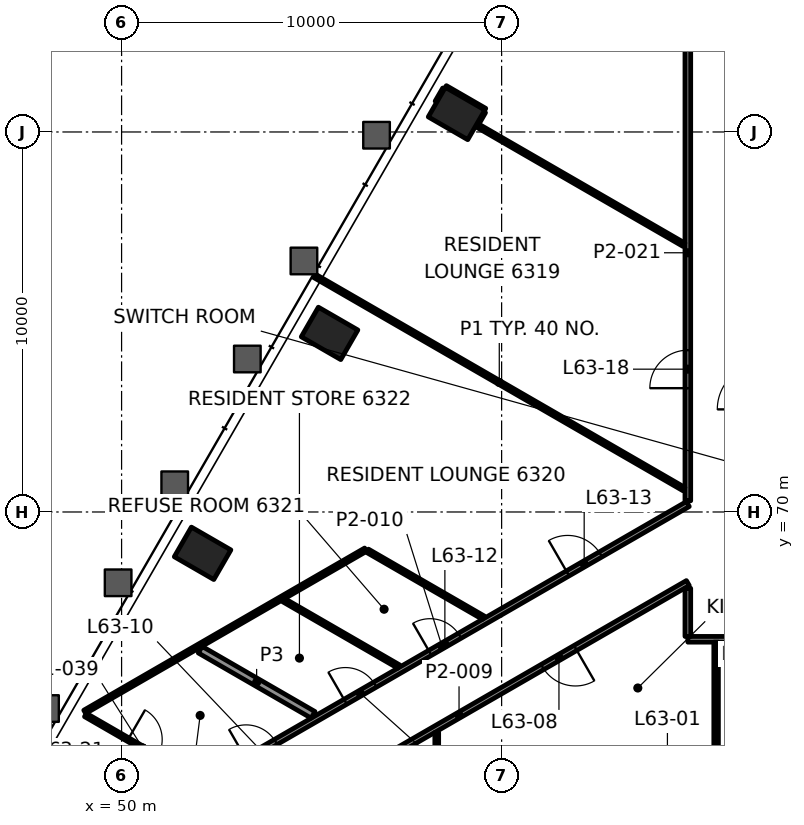
"""IFC4 building model, lengths in metres.
Left out: names, types, materials, properties, quantities, classifications, styles, units other than length and angle.
Written with IfcOpenShell. Run it as: python <this file> out.ifc"""

import sys

from ifc_helpers import new_model, si_unit, direction, frame, frame_2d, origin, origin_2d, place, context, subcontext, project, spatial, rectangle, hollow_rectangle, extrude, element, fill, save


model = new_model("IFC4")
c1 = context("Model", 3, precision=1e-05, world=origin(), true_north=direction((0.0, 1.0)))
c2 = subcontext(c1, "Body", "Model", "MODEL_VIEW")
j1 = project(units=[si_unit("LENGTHUNIT", "METRE"), si_unit("PLANEANGLEUNIT", "RADIAN")], contexts=[c1])
p1 = place(None, origin())
s1 = spatial("IfcSite", under=j1, at=p1, CompositionType="ELEMENT")
p2 = place(p1, origin())
s2 = spatial("IfcBuilding", under=s1, at=p2, CompositionType="ELEMENT")
p3 = place(p2, frame((0.0, 0.0, 267.1)))
s3 = spatial("IfcBuildingStorey", under=s2, at=p3, CompositionType="ELEMENT", Elevation=267.1)
for number, where, z_axis, x_axis in (
    (1, (58.814, 80.487, -0.0), (0.0, 0.0, 1.0), (-0.5, -0.866, 0.0)),
    (2, (55.473, 74.699, -0.0), (0.0, 0.0, 1.0), (-0.5, -0.866, 0.0)),
    (3, (52.131, 68.912, -0.0), (0.0, 0.0, 1.0), (-0.5, -0.866, 0.0)),
):
    element("IfcColumn", number, at=place(p3, frame(where, z_axis=z_axis, x_axis=x_axis)), inside=s3, PredefinedType="COLUMN", context=c2, shape_type="SweptSolid", body=[
        extrude(hollow_rectangle(XDim=0.9, YDim=1.2, WallThickness=0.06, at=origin_2d()), origin(), (0.0, 0.0, 1.0), 3.5),
    ])
p4 = place(p3, frame((85.1, 66.65, 0.0), z_axis=(0.0, 0.0, 1.0), x_axis=(-1.0, 0.0, 0.0)))
e4 = element("IfcWall", 4, at=p4, inside=s3, PredefinedType="PARTITIONING", context=c2, shape_type="SweptSolid", body=[
    extrude(rectangle(XDim=20.2, YDim=0.15, at=frame_2d((10.1, 0.0))), origin(), (0.0, 0.0, 1.0), 2.7),
])
p5 = place(p4, frame((1.61, 0.0, 0.0)))
e5 = element("IfcOpeningElement", 5, at=p5, cuts=e4, PredefinedType="OPENING", context=c2, shape_type="SweptSolid", body=[
    extrude(rectangle(XDim=1.0, YDim=2.1, at=frame_2d((0.5, 1.05))), frame((0.0, 0.085, 0.0), z_axis=(0.0, -1.0, 0.0), x_axis=(1.0, 0.0, 0.0)), (0.0, 0.0, 1.0), 0.17),
])
p6 = place(p4, frame((8.229, 0.0, 0.0)))
e6 = element("IfcOpeningElement", 6, at=p6, cuts=e4, PredefinedType="OPENING", context=c2, shape_type="SweptSolid", body=[
    extrude(rectangle(XDim=1.0, YDim=2.1, at=frame_2d((0.5, 1.05))), frame((0.0, 0.085, 0.0), z_axis=(0.0, -1.0, 0.0), x_axis=(1.0, 0.0, 0.0)), (0.0, 0.0, 1.0), 0.17),
])
p7 = place(p3, frame((64.9, 68.13, 0.0), z_axis=(0.0, 0.0, 1.0), x_axis=(-0.866020369651, -0.500008719273, 0.0)))
e7 = element("IfcWall", 7, at=p7, inside=s3, PredefinedType="PARTITIONING", context=c2, shape_type="SweptSolid", body=[
    extrude(rectangle(XDim=13.904, YDim=0.15, at=frame_2d((6.952, 0.0))), origin(), (0.0, 0.0, 1.0), 2.547),
])
p8 = place(p7, frame((3.416, 0.0, 0.0)))
e8 = element("IfcOpeningElement", 8, at=p8, cuts=e7, PredefinedType="OPENING", context=c2, shape_type="SweptSolid", body=[
    extrude(rectangle(XDim=1.0, YDim=2.1, at=frame_2d((0.5, 1.05))), frame((0.0, 0.085, 0.0), z_axis=(0.0, -1.0, 0.0), x_axis=(1.0, 0.0, 0.0)), (0.0, 0.0, 1.0), 0.17),
])
p9 = place(p7, frame((10.215, 0.0, 0.0)))
e9 = element("IfcOpeningElement", 9, at=p9, cuts=e7, PredefinedType="OPENING", context=c2, shape_type="SweptSolid", body=[
    extrude(rectangle(XDim=0.9, YDim=2.1, at=frame_2d((0.45, 1.05))), frame((0.0, 0.085, 0.0), z_axis=(0.0, -1.0, 0.0), x_axis=(1.0, 0.0, 0.0)), (0.0, 0.0, 1.0), 0.17),
])
p10 = place(p3, frame((51.959, 62.736, 0.0), z_axis=(0.0, 0.0, 1.0), x_axis=(0.866022614424, 0.500004831283, 0.0)))
e10 = element("IfcWall", 10, at=p10, inside=s3, PredefinedType="PARTITIONING", context=c2, shape_type="SweptSolid", body=[
    extrude(rectangle(XDim=14.943, YDim=0.15, at=frame_2d((7.472, 0.0))), origin(), (0.0, 0.0, 1.0), 2.7),
])
p11 = place(p10, frame((1.522, 0.0, 0.0)))
e11 = element("IfcOpeningElement", 11, at=p11, cuts=e10, PredefinedType="OPENING", context=c2, shape_type="SweptSolid", body=[
    extrude(rectangle(XDim=0.9, YDim=2.1, at=frame_2d((0.45, 1.05))), frame((0.0, 0.085, 0.0), z_axis=(0.0, -1.0, 0.0), x_axis=(1.0, 0.0, 0.0)), (0.0, 0.0, 1.0), 0.17),
])
p12 = place(p10, frame((4.539, 0.0, 0.0)))
e12 = element("IfcOpeningElement", 12, at=p12, cuts=e10, PredefinedType="OPENING", context=c2, shape_type="SweptSolid", body=[
    extrude(rectangle(XDim=0.9, YDim=2.1, at=frame_2d((0.45, 1.05))), frame((0.0, 0.085, 0.0), z_axis=(0.0, -1.0, 0.0), x_axis=(1.0, 0.0, 0.0)), (0.0, 0.0, 1.0), 0.17),
])
p13 = place(p10, frame((7.111, 0.0, 0.0)))
e13 = element("IfcOpeningElement", 13, at=p13, cuts=e10, PredefinedType="OPENING", context=c2, shape_type="SweptSolid", body=[
    extrude(rectangle(XDim=0.9, YDim=2.1, at=frame_2d((0.45, 1.05))), frame((0.0, 0.085, 0.0), z_axis=(0.0, -1.0, 0.0), x_axis=(1.0, 0.0, 0.0)), (0.0, 0.0, 1.0), 0.17),
])
p14 = place(p10, frame((11.294, 0.0, 0.0)))
e14 = element("IfcOpeningElement", 14, at=p14, cuts=e10, PredefinedType="OPENING", context=c2, shape_type="SweptSolid", body=[
    extrude(rectangle(XDim=1.0, YDim=2.1, at=frame_2d((0.5, 1.05))), frame((0.0, 0.085, 0.0), z_axis=(0.0, -1.0, 0.0), x_axis=(1.0, 0.0, 0.0)), (0.0, 0.0, 1.0), 0.17),
])
p15 = place(p3, frame((49.03, 64.741, 0.0), z_axis=(0.0, 0.0, 1.0), x_axis=(0.866019796467, 0.500009712033, 0.0)))
e15 = element("IfcWall", 15, at=p15, inside=s3, PredefinedType="PARTITIONING", context=c2, shape_type="SweptSolid", body=[
    extrude(rectangle(XDim=8.534, YDim=0.1, at=frame_2d((4.267, 0.0))), origin(), (0.0, 0.0, 1.0), 2.7),
])
p16 = place(p3, frame((59.359, 80.23, 0.0), z_axis=(0.0, 0.0, 1.0), x_axis=(0.499539972301, 0.866290838041, 0.0)))
e16 = element("IfcWall", 16, at=p16, inside=s3, PredefinedType="PARTITIONING", context=c2, shape_type="SweptSolid", body=[
    extrude(rectangle(XDim=0.347, YDim=0.1, at=frame_2d((0.174, 0.0))), origin(), (0.0, 0.0, 1.0), 2.7),
])
p17 = place(p3, frame((58.294, 80.787, 0.0), z_axis=(0.0, 0.0, 1.0), x_axis=(0.500165123728, 0.865930048564, 0.0)))
e17 = element("IfcWall", 17, at=p17, inside=s3, PredefinedType="PARTITIONING", context=c2, shape_type="SweptSolid", body=[
    extrude(rectangle(XDim=0.398, YDim=0.1, at=frame_2d((0.199, 0.0))), origin(), (0.0, 0.0, 1.0), 2.7),
])
p18 = place(p3, frame((65.644, 66.575, 0.0), z_axis=(0.0, 0.0, 1.0), x_axis=(0.0, -1.0, 0.0)))
e18 = element("IfcWall", 18, at=p18, inside=s3, PredefinedType="PARTITIONING", context=c2, shape_type="SweptSolid", body=[
    extrude(rectangle(XDim=9.436, YDim=0.12, at=frame_2d((4.718, 0.0))), origin(), (0.0, 0.0, 1.0), 2.688),
])
p19 = place(p18, frame((5.38, 0.0, 0.0)))
e19 = element("IfcOpeningElement", 19, at=p19, cuts=e18, PredefinedType="OPENING", context=c2, shape_type="SweptSolid", body=[
    extrude(rectangle(XDim=0.9, YDim=2.1, at=frame_2d((0.45, 1.05))), frame((0.0, 0.07, 0.0), z_axis=(0.0, -1.0, 0.0), x_axis=(1.0, 0.0, 0.0)), (0.0, 0.0, 1.0), 0.14),
])
p20 = place(p3, frame((64.9, 66.725, 0.0), z_axis=(0.0, 0.0, 1.0), x_axis=(0.0, 1.0, 0.0)))
e20 = element("IfcWall", 20, at=p20, inside=s3, PredefinedType="PARTITIONING", context=c2, shape_type="SweptSolid", body=[
    extrude(rectangle(XDim=1.268, YDim=0.15, at=frame_2d((0.634, 0.0))), origin(), (0.0, 0.0, 1.0), 2.547),
])
p21 = place(p3, frame((64.9, 70.295, 0.0), z_axis=(0.0, 0.0, 1.0), x_axis=(0.0, 1.0, 0.0)))
e21 = element("IfcWall", 21, at=p21, inside=s3, PredefinedType="PARTITIONING", context=c2, shape_type="SweptSolid", body=[
    extrude(rectangle(XDim=13.053, YDim=0.15, at=frame_2d((6.527, 0.0))), origin(), (0.0, 0.0, 1.0), 2.7),
])
p22 = place(p21, frame((2.963, 0.0, 0.0)))
e22 = element("IfcOpeningElement", 22, at=p22, cuts=e21, PredefinedType="OPENING", context=c2, shape_type="SweptSolid", body=[
    extrude(rectangle(XDim=1.0, YDim=2.1, at=frame_2d((0.5, 1.05))), frame((0.0, 0.085, 0.0), z_axis=(0.0, -1.0, 0.0), x_axis=(1.0, 0.0, 0.0)), (0.0, 0.0, 1.0), 0.17),
])
p23 = place(p3, frame((59.557, 80.578, 0.0), z_axis=(0.0, 0.0, 1.0), x_axis=(-0.866035997947, 0.499981649923, 0.0)))
e23 = element("IfcWall", 23, at=p23, inside=s3, PredefinedType="PARTITIONING", context=c2, shape_type="SweptSolid", body=[
    extrude(rectangle(XDim=1.196, YDim=0.1, at=frame_2d((0.598, 0.0))), origin(), (0.0, 0.0, 1.0), 2.688),
])
p24 = place(p3, frame((64.799, 77.032, 0.0), z_axis=(0.0, 0.0, 1.0), x_axis=(-0.866032246126, 0.49998814853, 0.0)))
e24 = element("IfcWall", 24, at=p24, inside=s3, PredefinedType="PARTITIONING", context=c2, shape_type="SweptSolid", body=[
    extrude(rectangle(XDim=6.31, YDim=0.1, at=frame_2d((3.155, 0.0))), origin(), (0.0, 0.0, 1.0), 2.7),
])
p25 = place(p3, frame((64.799, 70.601, 0.0), z_axis=(0.0, 0.0, 1.0), x_axis=(-0.86602224969, 0.500005463012, 0.0)))
e25 = element("IfcWall", 25, at=p25, inside=s3, PredefinedType="PARTITIONING", context=c2, shape_type="SweptSolid", body=[
    extrude(rectangle(XDim=11.226, YDim=0.1, at=frame_2d((5.613, 0.0))), origin(), (0.0, 0.0, 1.0), 2.688),
])
p26 = place(p3, frame((59.52, 67.219, 0.0), z_axis=(0.0, 0.0, 1.0), x_axis=(-0.866011216541, 0.500024572222, 0.0)))
e26 = element("IfcWall", 26, at=p26, inside=s3, PredefinedType="PARTITIONING", context=c2, shape_type="SweptSolid", body=[
    extrude(rectangle(XDim=3.521, YDim=0.1, at=frame_2d((1.76, 0.0))), origin(), (0.0, 0.0, 1.0), 2.7),
])
p27 = place(p3, frame((57.292, 65.932, 0.0), z_axis=(0.0, 0.0, 1.0), x_axis=(-0.866017863565, 0.500013059815, 0.0)))
e27 = element("IfcWall", 27, at=p27, inside=s3, PredefinedType="PARTITIONING", context=c2, shape_type="SweptSolid", body=[
    extrude(rectangle(XDim=3.491, YDim=0.1, at=frame_2d((1.745, 0.0))), origin(), (0.0, 0.0, 1.0), 2.7),
])
p28 = place(p3, frame((55.039, 64.662, 0.0), z_axis=(0.0, 0.0, 1.0), x_axis=(-0.866036273972, 0.49998117181, 0.0)))
e28 = element("IfcWall", 28, at=p28, inside=s3, PredefinedType="PARTITIONING", context=c2, shape_type="SweptSolid", body=[
    extrude(rectangle(XDim=3.431, YDim=0.2, at=frame_2d((1.715, 0.0))), origin(), (0.0, 0.0, 1.0), 2.7),
])
p29 = place(p3, frame((49.049, 64.658, 0.0), z_axis=(0.0, 0.0, 1.0), x_axis=(0.866031592922, -0.499989279946, 0.0)))
e29 = element("IfcWall", 29, at=p29, inside=s3, PredefinedType="PARTITIONING", context=c2, shape_type="SweptSolid", body=[
    extrude(rectangle(XDim=3.485, YDim=0.1, at=frame_2d((1.742, 0.0))), origin(), (0.0, 0.0, 1.0), 2.7),
])
p30 = place(p29, frame((1.292, 0.0, 0.0)))
e30 = element("IfcOpeningElement", 30, at=p30, cuts=e29, PredefinedType="OPENING", context=c2, shape_type="SweptSolid", body=[
    extrude(rectangle(XDim=0.9, YDim=2.1, at=frame_2d((0.45, 1.05))), frame((0.0, 0.06, 0.0), z_axis=(0.0, -1.0, 0.0), x_axis=(1.0, 0.0, 0.0)), (0.0, 0.0, 1.0), 0.12),
])
p31 = place(p3, frame((58.293, 60.938, 0.0), z_axis=(0.0, 0.0, 1.0), x_axis=(0.0, 1.0, 0.0)))
e31 = element("IfcWall", 31, at=p31, inside=s3, PredefinedType="PARTITIONING", context=c2, shape_type="SweptSolid", body=[
    extrude(rectangle(XDim=3.261, YDim=0.1, at=frame_2d((1.63, 0.0))), origin(), (0.0, 0.0, 1.0), 2.7),
])
p32 = place(p8, origin())
e32 = element("IfcDoor", 32, at=p32, inside=s3, OperationType="SINGLE_SWING_RIGHT", PredefinedType="DOOR", context=c2, shape_type="SweptSolid", body=[
    extrude(rectangle(XDim=1.0, YDim=2.1, at=frame_2d((0.5, 1.05))), frame((0.0, 0.025, 0.0), z_axis=(0.0, -1.0, 0.0), x_axis=(1.0, 0.0, 0.0)), (0.0, 0.0, 1.0), 0.05),
])
fill(e8, e32)
p33 = place(p11, origin())
e33 = element("IfcDoor", 33, at=p33, inside=s3, OperationType="SINGLE_SWING_RIGHT", PredefinedType="DOOR", context=c2, shape_type="SweptSolid", body=[
    extrude(rectangle(XDim=0.9, YDim=2.1, at=frame_2d((0.45, 1.05))), frame((0.0, 0.025, 0.0), z_axis=(0.0, -1.0, 0.0), x_axis=(1.0, 0.0, 0.0)), (0.0, 0.0, 1.0), 0.05),
])
fill(e11, e33)
p34 = place(p12, origin())
e34 = element("IfcDoor", 34, at=p34, inside=s3, OperationType="SINGLE_SWING_LEFT", PredefinedType="DOOR", context=c2, shape_type="SweptSolid", body=[
    extrude(rectangle(XDim=0.9, YDim=2.1, at=frame_2d((0.45, 1.05))), frame((0.0, 0.025, 0.0), z_axis=(0.0, -1.0, 0.0), x_axis=(1.0, 0.0, 0.0)), (0.0, 0.0, 1.0), 0.05),
])
fill(e12, e34)
p35 = place(p13, origin())
e35 = element("IfcDoor", 35, at=p35, inside=s3, OperationType="SINGLE_SWING_RIGHT", PredefinedType="DOOR", context=c2, shape_type="SweptSolid", body=[
    extrude(rectangle(XDim=0.9, YDim=2.1, at=frame_2d((0.45, 1.05))), frame((0.0, 0.025, 0.0), z_axis=(0.0, -1.0, 0.0), x_axis=(1.0, 0.0, 0.0)), (0.0, 0.0, 1.0), 0.05),
])
fill(e13, e35)
p36 = place(p14, origin())
e36 = element("IfcDoor", 36, at=p36, inside=s3, OperationType="SINGLE_SWING_LEFT", PredefinedType="DOOR", context=c2, shape_type="SweptSolid", body=[
    extrude(rectangle(XDim=1.0, YDim=2.1, at=frame_2d((0.5, 1.05))), frame((0.0, 0.025, 0.0), z_axis=(0.0, -1.0, 0.0), x_axis=(1.0, 0.0, 0.0)), (0.0, 0.0, 1.0), 0.05),
])
fill(e14, e36)
p37 = place(p22, origin())
e37 = element("IfcDoor", 37, at=p37, inside=s3, OperationType="SINGLE_SWING_RIGHT", PredefinedType="DOOR", context=c2, shape_type="SweptSolid", body=[
    extrude(rectangle(XDim=1.0, YDim=2.1, at=frame_2d((0.5, 1.05))), frame((0.0, 0.025, 0.0), z_axis=(0.0, -1.0, 0.0), x_axis=(1.0, 0.0, 0.0)), (0.0, 0.0, 1.0), 0.05),
])
fill(e22, e37)
p38 = place(p30, origin())
e38 = element("IfcDoor", 38, at=p38, inside=s3, OperationType="SINGLE_SWING_RIGHT", PredefinedType="DOOR", context=c2, shape_type="SweptSolid", body=[
    extrude(rectangle(XDim=0.9, YDim=2.1, at=frame_2d((0.45, 1.05))), frame((0.0, 0.025, 0.0), z_axis=(0.0, -1.0, 0.0), x_axis=(1.0, 0.0, 0.0)), (0.0, 0.0, 1.0), 0.05),
])
fill(e30, e38)
save(model, sys.argv[1])
